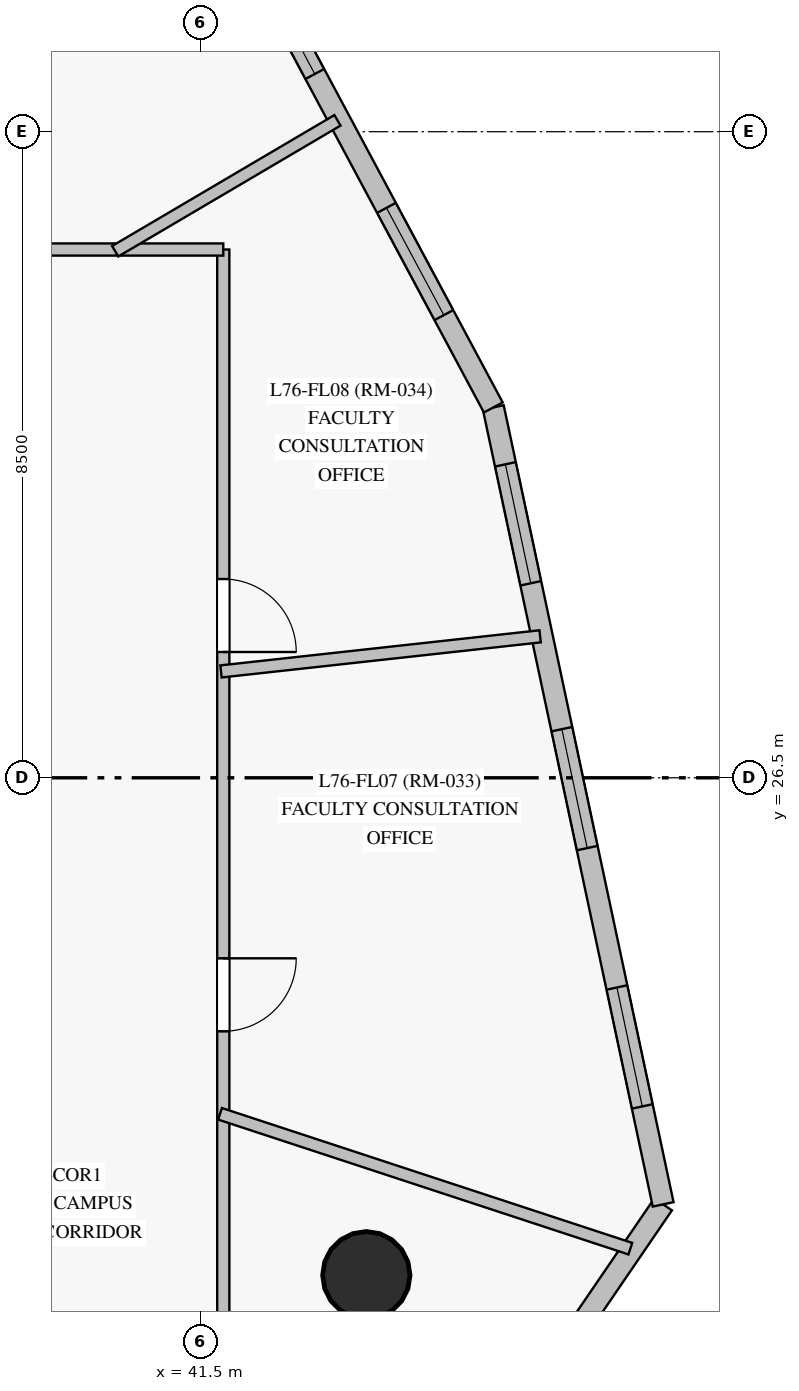
"""IFC4 building model, lengths in metres.
Left out: names, types, materials, properties, quantities, classifications, styles, units other than length and angle.
Written with IfcOpenShell. Run it as: python <this file> out.ifc"""

import sys

from ifc_helpers import new_model, si_unit, direction, frame, frame_2d, origin, origin_with_axes, origin_2d, place, context, subcontext, project, spatial, rectangle, circle, extrude, source, transform, mapped, element, fill, save


model = new_model("IFC4")
c1 = context("Model", 3, precision=1e-05, world=origin(), true_north=direction((0.0, 1.0)))
c2 = subcontext(c1, "Body", "Model", "MODEL_VIEW")
j1 = project(units=[si_unit("LENGTHUNIT", "METRE"), si_unit("PLANEANGLEUNIT", "RADIAN")], contexts=[c1])
p1 = place(None, origin())
s1 = spatial("IfcSite", under=j1, at=p1, CompositionType="ELEMENT")
p2 = place(p1, origin())
s2 = spatial("IfcBuilding", under=s1, at=p2, CompositionType="ELEMENT")
p3 = place(p2, frame((0.0, 0.0, 256.55)))
s3 = spatial("IfcBuildingStorey", under=s2, at=p3, CompositionType="ELEMENT", Elevation=256.55)
m1 = source(origin_with_axes(), c2, "Body", "SweptSolid", [
    extrude(circle(Radius=0.575, at=origin_2d()), origin(), (0.0, 0.0, 1.0), 3.05),
])
p4 = place(p3, frame((43.682, 19.956, 0.0), z_axis=(0.0, 0.0, 1.0), x_axis=(1.0, 0.0, 0.0)))
e1 = element("IfcColumn", 1, at=p4, inside=s3, PredefinedType="COLUMN", context=c2, shape_type="MappedRepresentation", body=[
    mapped(m1, transform((0.0, 0.0, 0.0), scale=1.0)),
])
p5 = place(p3, frame((42.584, 13.563, 0.0), z_axis=(0.0, 0.0, 1.0), x_axis=(0.564007879962, 0.82576940567, 0.0)))
e2 = element("IfcWall", 2, at=p5, inside=s3, PredefinedType="SOLIDWALL", context=c2, shape_type="SweptSolid", body=[
    extrude(rectangle(XDim=8.871, YDim=0.28, at=frame_2d((4.436, 0.0))), origin(), (0.0, 0.0, 1.0), 2.85),
])
p6 = place(p5, frame((1.439, 0.0, 0.85)))
e3 = element("IfcOpeningElement", 3, at=p6, cuts=e2, PredefinedType="OPENING", context=c2, shape_type="SweptSolid", body=[
    extrude(rectangle(XDim=1.6, YDim=1.6, at=frame_2d((0.8, 0.8))), frame((0.0, 0.15, 0.0), z_axis=(0.0, -1.0, 0.0), x_axis=(1.0, 0.0, 0.0)), (0.0, 0.0, 1.0), 0.3),
])
p7 = place(p5, frame((5.157, 0.0, 0.85)))
e4 = element("IfcOpeningElement", 4, at=p7, cuts=e2, PredefinedType="OPENING", context=c2, shape_type="SweptSolid", body=[
    extrude(rectangle(XDim=1.6, YDim=1.6, at=frame_2d((0.8, 0.8))), frame((0.0, 0.15, 0.0), z_axis=(0.0, -1.0, 0.0), x_axis=(1.0, 0.0, 0.0)), (0.0, 0.0, 1.0), 0.3),
])
p8 = place(p3, frame((47.587, 20.888, 0.0), z_axis=(0.0, 0.0, 1.0), x_axis=(-0.208460422932, 0.978030803232, 0.0)))
e5 = element("IfcWall", 5, at=p8, inside=s3, PredefinedType="SOLIDWALL", context=c2, shape_type="SweptSolid", body=[
    extrude(rectangle(XDim=10.72, YDim=0.28, at=frame_2d((5.36, 0.0))), origin(), (0.0, 0.0, 1.0), 2.85),
])
p9 = place(p8, frame((1.317, 0.0, 0.85)))
e6 = element("IfcOpeningElement", 6, at=p9, cuts=e5, PredefinedType="OPENING", context=c2, shape_type="SweptSolid", body=[
    extrude(rectangle(XDim=1.6, YDim=1.6, at=frame_2d((0.8, 0.8))), frame((0.0, 0.15, 0.0), z_axis=(0.0, -1.0, 0.0), x_axis=(1.0, 0.0, 0.0)), (0.0, 0.0, 1.0), 0.3),
])
p10 = place(p8, frame((4.792, 0.0, 0.85)))
e7 = element("IfcOpeningElement", 7, at=p10, cuts=e5, PredefinedType="OPENING", context=c2, shape_type="SweptSolid", body=[
    extrude(rectangle(XDim=1.6, YDim=1.6, at=frame_2d((0.8, 0.8))), frame((0.0, 0.15, 0.0), z_axis=(0.0, -1.0, 0.0), x_axis=(1.0, 0.0, 0.0)), (0.0, 0.0, 1.0), 0.3),
])
p11 = place(p8, frame((8.354, 0.0, 0.85)))
e8 = element("IfcOpeningElement", 8, at=p11, cuts=e5, PredefinedType="OPENING", context=c2, shape_type="SweptSolid", body=[
    extrude(rectangle(XDim=1.6, YDim=1.6, at=frame_2d((0.8, 0.8))), frame((0.0, 0.15, 0.0), z_axis=(0.0, -1.0, 0.0), x_axis=(1.0, 0.0, 0.0)), (0.0, 0.0, 1.0), 0.3),
])
p12 = place(p3, frame((45.352, 31.372, 0.0), z_axis=(0.0, 0.0, 1.0), x_axis=(-0.471937066775, 0.881632239091, 0.0)))
e9 = element("IfcWall", 9, at=p12, inside=s3, PredefinedType="SOLIDWALL", context=c2, shape_type="SweptSolid", body=[
    extrude(rectangle(XDim=7.315, YDim=0.28, at=frame_2d((3.658, 0.0))), origin(), (0.0, 0.0, 1.0), 2.85),
])
p13 = place(p12, frame((1.378, 0.0, 0.85)))
e10 = element("IfcOpeningElement", 10, at=p13, cuts=e9, PredefinedType="OPENING", context=c2, shape_type="SweptSolid", body=[
    extrude(rectangle(XDim=1.6, YDim=1.6, at=frame_2d((0.8, 0.8))), frame((0.0, 0.15, 0.0), z_axis=(0.0, -1.0, 0.0), x_axis=(1.0, 0.0, 0.0)), (0.0, 0.0, 1.0), 0.3),
])
p14 = place(p12, frame((4.976, 0.0, 0.85)))
e11 = element("IfcOpeningElement", 11, at=p14, cuts=e9, PredefinedType="OPENING", context=c2, shape_type="SweptSolid", body=[
    extrude(rectangle(XDim=1.6, YDim=1.6, at=frame_2d((0.8, 0.8))), frame((0.0, 0.15, 0.0), z_axis=(0.0, -1.0, 0.0), x_axis=(1.0, 0.0, 0.0)), (0.0, 0.0, 1.0), 0.3),
])
p15 = place(p3, frame((41.8, 33.45, 0.0), z_axis=(0.0, 0.0, 1.0), x_axis=(0.0, -1.0, 0.0)))
e12 = element("IfcWall", 12, at=p15, inside=s3, PredefinedType="PARTITIONING", context=c2, shape_type="SweptSolid", body=[
    extrude(rectangle(XDim=19.6, YDim=0.16, at=frame_2d((9.8, 0.0))), origin(), (0.0, 0.0, 1.0), 2.3),
])
p16 = place(p15, frame((9.325, 0.0, 0.0)))
e13 = element("IfcOpeningElement", 13, at=p16, cuts=e12, PredefinedType="OPENING", context=c2, shape_type="SweptSolid", body=[
    extrude(rectangle(XDim=0.96, YDim=2.15, at=frame_2d((0.48, 1.075))), frame((0.0, 0.09, 0.0), z_axis=(0.0, -1.0, 0.0), x_axis=(1.0, 0.0, 0.0)), (0.0, 0.0, 1.0), 0.18),
])
p17 = place(p15, frame((4.335, 0.0, 0.0)))
e14 = element("IfcOpeningElement", 14, at=p17, cuts=e12, PredefinedType="OPENING", context=c2, shape_type="SweptSolid", body=[
    extrude(rectangle(XDim=0.96, YDim=2.15, at=frame_2d((0.48, 1.075))), frame((0.0, 0.09, 0.0), z_axis=(0.0, -1.0, 0.0), x_axis=(1.0, 0.0, 0.0)), (0.0, 0.0, 1.0), 0.18),
])
p18 = place(p3, frame((41.757, 22.08, 0.0), z_axis=(0.0, 0.0, 1.0), x_axis=(0.949994063859, -0.312267959664, 0.0)))
e15 = element("IfcWall", 15, at=p18, inside=s3, PredefinedType="PARTITIONING", context=c2, shape_type="SweptSolid", body=[
    extrude(rectangle(XDim=5.682, YDim=0.16, at=frame_2d((2.841, 0.0))), origin(), (0.0, 0.0, 1.0), 2.85),
])
p19 = place(p3, frame((41.77, 27.899, 0.0), z_axis=(0.0, 0.0, 1.0), x_axis=(0.994007182885, 0.109314776553, 0.0)))
e16 = element("IfcWall", 16, at=p19, inside=s3, PredefinedType="PARTITIONING", context=c2, shape_type="SweptSolid", body=[
    extrude(rectangle(XDim=4.223, YDim=0.16, at=frame_2d((2.112, 0.0))), origin(), (0.0, 0.0, 1.0), 2.85),
])
p20 = place(p3, frame((37.682, 33.45, 0.0), z_axis=(0.0, 0.0, 1.0), x_axis=(1.0, 0.0, 0.0)))
e17 = element("IfcWall", 17, at=p20, inside=s3, PredefinedType="PARTITIONING", context=c2, shape_type="SweptSolid", body=[
    extrude(rectangle(XDim=4.118, YDim=0.16, at=frame_2d((2.059, 0.0))), origin(), (0.0, 0.0, 1.0), 2.85),
])
p21 = place(p20, frame((0.733, 0.0, 0.0)))
e18 = element("IfcOpeningElement", 18, at=p21, cuts=e17, PredefinedType="OPENING", context=c2, shape_type="SweptSolid", body=[
    extrude(rectangle(XDim=0.96, YDim=2.15, at=frame_2d((0.48, 1.075))), frame((0.0, 0.09, 0.0), z_axis=(0.0, -1.0, 0.0), x_axis=(1.0, 0.0, 0.0)), (0.0, 0.0, 1.0), 0.18),
])
p22 = place(p3, frame((40.378, 33.427, 0.0), z_axis=(0.0, 0.0, 1.0), x_axis=(0.861628913846, 0.507538781597, 0.0)))
e19 = element("IfcWall", 19, at=p22, inside=s3, PredefinedType="PARTITIONING", context=c2, shape_type="SweptSolid", body=[
    extrude(rectangle(XDim=3.394, YDim=0.16, at=frame_2d((1.697, 0.0))), origin(), (0.0, 0.0, 1.0), 2.85),
])
m2 = source(origin_with_axes(), c2, "Body", "SweptSolid", [
    extrude(rectangle(XDim=1.6, YDim=1.6, at=frame_2d((0.8, 0.8))), frame((0.0, 0.03, 0.0), z_axis=(0.0, -1.0, 0.0), x_axis=(1.0, 0.0, 0.0)), (0.0, 0.0, 1.0), 0.06),
])
p23 = place(p9, origin())
e20 = element("IfcWindow", 20, at=p23, inside=s3, PartitioningType="SINGLE_PANEL", PredefinedType="WINDOW", context=c2, shape_type="MappedRepresentation", body=[
    mapped(m2, transform((0.0, 0.0, 0.0), scale=1.0)),
])
fill(e6, e20)
p24 = place(p10, origin())
e21 = element("IfcWindow", 21, at=p24, inside=s3, PartitioningType="SINGLE_PANEL", PredefinedType="WINDOW", context=c2, shape_type="MappedRepresentation", body=[
    mapped(m2, transform((0.0, 0.0, 0.0), scale=1.0)),
])
fill(e7, e21)
p25 = place(p11, origin())
e22 = element("IfcWindow", 22, at=p25, inside=s3, PartitioningType="SINGLE_PANEL", PredefinedType="WINDOW", context=c2, shape_type="MappedRepresentation", body=[
    mapped(m2, transform((0.0, 0.0, 0.0), scale=1.0)),
])
fill(e8, e22)
p26 = place(p13, origin())
e23 = element("IfcWindow", 23, at=p26, inside=s3, PartitioningType="SINGLE_PANEL", PredefinedType="WINDOW", context=c2, shape_type="MappedRepresentation", body=[
    mapped(m2, transform((0.0, 0.0, 0.0), scale=1.0)),
])
fill(e10, e23)
p27 = place(p14, origin())
e24 = element("IfcWindow", 24, at=p27, inside=s3, PartitioningType="SINGLE_PANEL", PredefinedType="WINDOW", context=c2, shape_type="MappedRepresentation", body=[
    mapped(m2, transform((0.0, 0.0, 0.0), scale=1.0)),
])
fill(e11, e24)
m3 = source(origin_with_axes(), c2, "Body", "SweptSolid", [
    extrude(rectangle(XDim=0.96, YDim=2.15, at=frame_2d((0.48, 1.075))), frame((0.0, 0.025, 0.0), z_axis=(0.0, -1.0, 0.0), x_axis=(1.0, 0.0, 0.0)), (0.0, 0.0, 1.0), 0.05),
])
p28 = place(p16, origin())
e25 = element("IfcDoor", 25, at=p28, inside=s3, OperationType="SINGLE_SWING_LEFT", PredefinedType="DOOR", context=c2, shape_type="MappedRepresentation", body=[
    mapped(m3, transform((0.0, 0.0, 0.0), scale=1.0)),
])
fill(e13, e25)
p29 = place(p17, origin())
e26 = element("IfcDoor", 26, at=p29, inside=s3, OperationType="SINGLE_SWING_RIGHT", PredefinedType="DOOR", context=c2, shape_type="MappedRepresentation", body=[
    mapped(m3, transform((0.0, 0.0, 0.0), scale=1.0)),
])
fill(e14, e26)
save(model, sys.argv[1])
